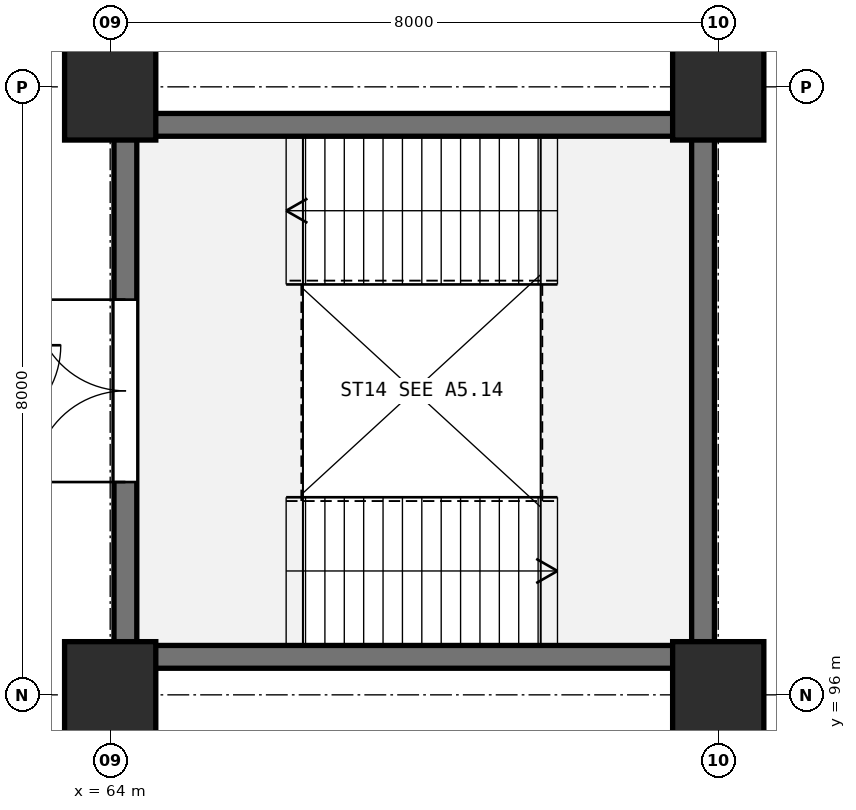
"""IFC4 building model, lengths in metres.
Left out: names, types, materials, properties, quantities, classifications, styles, units other than length and angle.
Written with IfcOpenShell. Run it as: python <this file> out.ifc"""

import sys

from ifc_helpers import new_model, si_unit, direction, frame, frame_2d, origin, origin_2d, place, context, subcontext, project, spatial, rectangle, extrude, element, fill, save


model = new_model("IFC4")
c1 = context("Model", 3, precision=1e-05, world=origin(), true_north=direction((0.0, 1.0)))
c2 = subcontext(c1, "Body", "Model", "MODEL_VIEW")
j1 = project(units=[si_unit("LENGTHUNIT", "METRE"), si_unit("PLANEANGLEUNIT", "RADIAN")], contexts=[c1])
p1 = place(None, origin())
s1 = spatial("IfcSite", under=j1, at=p1, CompositionType="ELEMENT")
p2 = place(p1, origin())
s2 = spatial("IfcBuilding", under=s1, at=p2, CompositionType="ELEMENT")
p3 = place(p2, origin())
s3 = spatial("IfcBuildingStorey", under=s2, at=p3, CompositionType="ELEMENT", Elevation=0.0)
for number, where, z_axis, x_axis in (
    (1, (64.0, 96.0, 0.0), (0.0, 0.0, 1.0), (1.0, 0.0, 0.0)),
    (2, (64.0, 104.0, 0.0), (0.0, 0.0, 1.0), (1.0, 0.0, 0.0)),
    (3, (72.0, 96.0, 0.0), (0.0, 0.0, 1.0), (1.0, 0.0, 0.0)),
    (4, (72.0, 104.0, 0.0), (0.0, 0.0, 1.0), (1.0, 0.0, 0.0)),
):
    element("IfcColumn", number, at=place(p3, frame(where, z_axis=z_axis, x_axis=x_axis)), inside=s3, PredefinedType="COLUMN", context=c2, shape_type="SweptSolid", body=[
        extrude(rectangle(XDim=1.2, YDim=1.4, at=origin_2d()), origin(), (0.0, 0.0, 1.0), 5.4),
    ])
p4 = place(p3, frame((71.8, 96.5, 0.0), z_axis=(0.0, 0.0, 1.0), x_axis=(-1.0, 0.0, 0.0)))
e5 = element("IfcWall", 5, at=p4, inside=s3, PredefinedType="SHEAR", context=c2, shape_type="SweptSolid", body=[
    extrude(rectangle(XDim=7.6, YDim=0.3, at=frame_2d((3.8, 0.0))), origin(), (0.0, 0.0, 1.0), 5.08),
])
p5 = place(p3, frame((64.2, 96.5, 0.0), z_axis=(0.0, 0.0, 1.0), x_axis=(0.0, 1.0, 0.0)))
e6 = element("IfcWall", 6, at=p5, inside=s3, PredefinedType="SHEAR", context=c2, shape_type="SweptSolid", body=[
    extrude(rectangle(XDim=7.0, YDim=0.3, at=frame_2d((3.5, 0.0))), origin(), (0.0, 0.0, 1.0), 5.08),
])
p6 = place(p5, frame((2.3, 0.0, 0.0)))
e7 = element("IfcOpeningElement", 7, at=p6, cuts=e6, PredefinedType="OPENING", context=c2, shape_type="SweptSolid", body=[
    extrude(rectangle(XDim=2.4, YDim=2.2, at=frame_2d((1.2, 1.1))), frame((0.0, 0.16, 0.0), z_axis=(0.0, -1.0, 0.0), x_axis=(1.0, 0.0, 0.0)), (0.0, 0.0, 1.0), 0.32),
])
p7 = place(p3, frame((64.2, 103.5, 0.0), z_axis=(0.0, 0.0, 1.0), x_axis=(1.0, 0.0, 0.0)))
e8 = element("IfcWall", 8, at=p7, inside=s3, PredefinedType="SHEAR", context=c2, shape_type="SweptSolid", body=[
    extrude(rectangle(XDim=7.6, YDim=0.3, at=frame_2d((3.8, 0.0))), origin(), (0.0, 0.0, 1.0), 5.08),
])
p8 = place(p3, frame((71.8, 103.5, 0.0), z_axis=(0.0, 0.0, 1.0), x_axis=(0.0, -1.0, 0.0)))
e9 = element("IfcWall", 9, at=p8, inside=s3, PredefinedType="SHEAR", context=c2, shape_type="SweptSolid", body=[
    extrude(rectangle(XDim=7.0, YDim=0.3, at=frame_2d((3.5, 0.0))), origin(), (0.0, 0.0, 1.0), 5.08),
])
p9 = place(p6, origin())
e10 = element("IfcDoor", 10, at=p9, inside=s3, OperationType="DOUBLE_DOOR_SINGLE_SWING", PredefinedType="DOOR", context=c2, shape_type="SweptSolid", body=[
    extrude(rectangle(XDim=2.4, YDim=2.2, at=frame_2d((1.2, 1.1))), frame((0.0, 0.025, 0.0), z_axis=(0.0, -1.0, 0.0), x_axis=(1.0, 0.0, 0.0)), (0.0, 0.0, 1.0), 0.05),
])
fill(e7, e10)
save(model, sys.argv[1])
